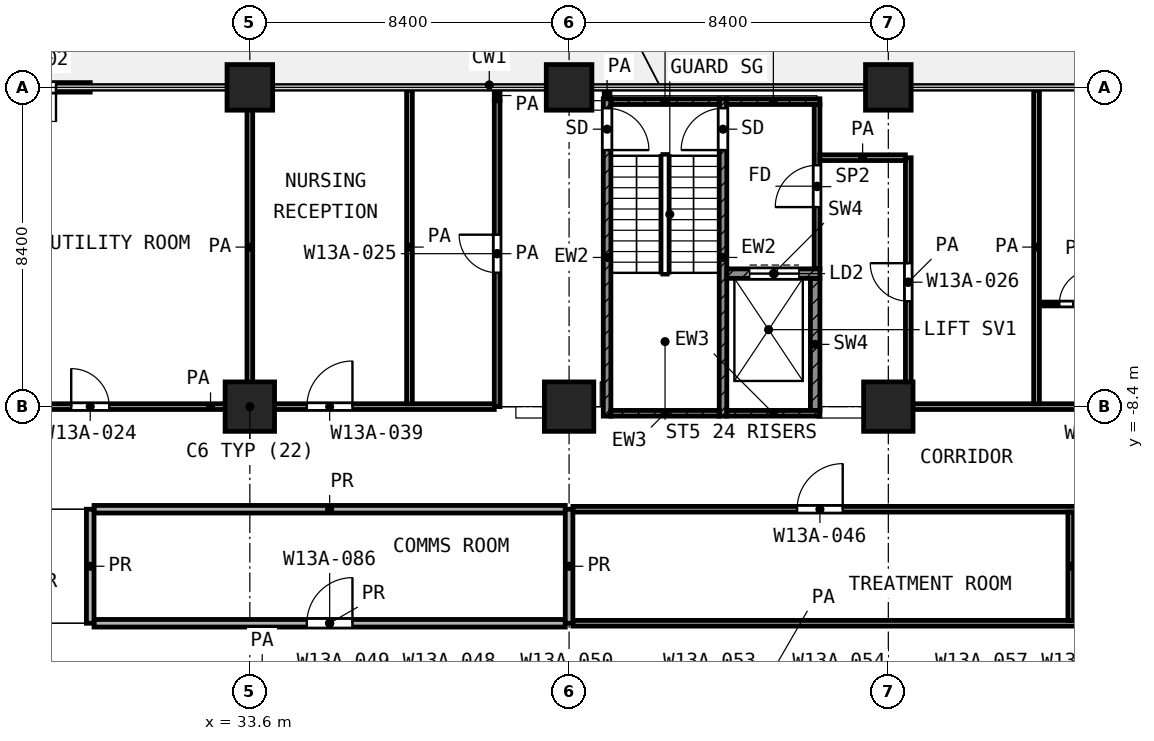
"""IFC4 building model, lengths in metres.
Left out: names, types, materials, properties, quantities, classifications, styles, units other than length and angle.
Written with IfcOpenShell. Run it as: python <this file> out.ifc"""

import sys

from ifc_helpers import new_model, si_unit, direction, frame, frame_2d, origin, origin_2d, place, context, subcontext, project, spatial, rectangle, extrude, element, fill, save


model = new_model("IFC4")
c1 = context("Model", 3, precision=1e-05, world=origin(), true_north=direction((0.0, 1.0)))
c2 = subcontext(c1, "Body", "Model", "MODEL_VIEW")
j1 = project(units=[si_unit("LENGTHUNIT", "METRE"), si_unit("PLANEANGLEUNIT", "RADIAN")], contexts=[c1])
p1 = place(None, origin())
s1 = spatial("IfcSite", under=j1, at=p1, CompositionType="ELEMENT")
p2 = place(p1, origin())
s2 = spatial("IfcBuilding", under=s1, at=p2, CompositionType="ELEMENT")
p3 = place(p2, frame((0.0, 0.0, 60.2)))
s3 = spatial("IfcBuildingStorey", under=s2, at=p3, CompositionType="ELEMENT", Elevation=60.2)
for number, where, z_axis, x_axis in (
    (1, (33.6, 0.0, 0.0), (0.0, 0.0, 1.0), (1.0, 0.0, 0.0)),
    (2, (42.0, 0.0, 0.0), (0.0, 0.0, 1.0), (1.0, 0.0, 0.0)),
    (3, (50.4, 0.0, 0.0), (0.0, 0.0, 1.0), (1.0, 0.0, 0.0)),
):
    element("IfcColumn", number, at=place(p3, frame(where, z_axis=z_axis, x_axis=x_axis)), inside=s3, PredefinedType="COLUMN", context=c2, shape_type="SweptSolid", body=[
        extrude(rectangle(XDim=1.2, YDim=1.2, at=origin_2d()), origin(), (0.0, 0.0, 1.0), 4.2),
    ])
for number, where, z_axis, x_axis in (
    (4, (33.6, -8.4, 0.0), (0.0, 0.0, 1.0), (1.0, 0.0, 0.0)),
    (5, (42.0, -8.4, 0.0), (0.0, 0.0, 1.0), (1.0, 0.0, 0.0)),
    (6, (50.4, -8.4, 0.0), (0.0, 0.0, 1.0), (1.0, 0.0, 0.0)),
):
    element("IfcColumn", number, at=place(p3, frame(where, z_axis=z_axis, x_axis=x_axis)), inside=s3, PredefinedType="COLUMN", context=c2, shape_type="SweptSolid", body=[
        extrude(rectangle(XDim=1.3, YDim=1.3, at=origin_2d()), origin(), (0.0, 0.0, 1.0), 4.2),
    ])
p4 = place(p3, frame((29.4, 0.0, 0.0), z_axis=(0.0, 0.0, 1.0), x_axis=(-1.0, 0.0, 0.0)))
e7 = element("IfcWall", 7, at=p4, inside=s3, PredefinedType="SOLIDWALL", context=c2, shape_type="SweptSolid", body=[
    extrude(rectangle(XDim=3.6, YDim=0.25, at=frame_2d((1.8, 0.0))), origin(), (0.0, 0.0, 1.0), 3.78),
])
p5 = place(p4, frame((0.9, 0.0, 0.0)))
e8 = element("IfcOpeningElement", 8, at=p5, cuts=e7, PredefinedType="OPENING", context=c2, shape_type="SweptSolid", body=[
    extrude(rectangle(XDim=1.8, YDim=2.1, at=frame_2d((0.9, 1.05))), frame((0.0, 0.135, 0.0), z_axis=(0.0, -1.0, 0.0), x_axis=(1.0, 0.0, 0.0)), (0.0, 0.0, 1.0), 0.27),
])
p6 = place(p3, frame((43.0, -8.65, 0.0), z_axis=(0.0, 0.0, 1.0), x_axis=(0.0, 1.0, 0.0)))
e9 = element("IfcWall", 9, at=p6, inside=s3, PredefinedType="SHEAR", context=c2, shape_type="SweptSolid", body=[
    extrude(rectangle(XDim=8.35, YDim=0.2, at=frame_2d((4.175, 0.0))), origin(), (0.0, 0.0, 1.0), 3.9),
])
p7 = place(p6, frame((7.0, 0.0, 0.0)))
e10 = element("IfcOpeningElement", 10, at=p7, cuts=e9, PredefinedType="OPENING", context=c2, shape_type="SweptSolid", body=[
    extrude(rectangle(XDim=1.1, YDim=2.1, at=frame_2d((0.55, 1.05))), frame((0.0, 0.11, 0.0), z_axis=(0.0, -1.0, 0.0), x_axis=(1.0, 0.0, 0.0)), (0.0, 0.0, 1.0), 0.22),
])
p8 = place(p3, frame((46.05, -8.65, 0.0), z_axis=(0.0, 0.0, 1.0), x_axis=(0.0, 1.0, 0.0)))
e11 = element("IfcWall", 11, at=p8, inside=s3, PredefinedType="SHEAR", context=c2, shape_type="SweptSolid", body=[
    extrude(rectangle(XDim=8.35, YDim=0.2, at=frame_2d((4.175, 0.0))), origin(), (0.0, 0.0, 1.0), 3.9),
])
p9 = place(p8, frame((7.0, 0.0, 0.0)))
e12 = element("IfcOpeningElement", 12, at=p9, cuts=e11, PredefinedType="OPENING", context=c2, shape_type="SweptSolid", body=[
    extrude(rectangle(XDim=1.1, YDim=2.1, at=frame_2d((0.55, 1.05))), frame((0.0, 0.11, 0.0), z_axis=(0.0, -1.0, 0.0), x_axis=(1.0, 0.0, 0.0)), (0.0, 0.0, 1.0), 0.22),
])
p10 = place(p3, frame((43.1, -0.375, 0.0), z_axis=(0.0, 0.0, 1.0), x_axis=(1.0, 0.0, 0.0)))
e13 = element("IfcWall", 13, at=p10, inside=s3, PredefinedType="SHEAR", context=c2, shape_type="SweptSolid", body=[
    extrude(rectangle(XDim=2.85, YDim=0.15, at=frame_2d((1.425, 0.0))), origin(), (0.0, 0.0, 1.0), 3.9),
])
p11 = place(p3, frame((46.15, -0.375, 0.0), z_axis=(0.0, 0.0, 1.0), x_axis=(1.0, 0.0, 0.0)))
e14 = element("IfcWall", 14, at=p11, inside=s3, PredefinedType="SHEAR", context=c2, shape_type="SweptSolid", body=[
    extrude(rectangle(XDim=2.45, YDim=0.15, at=frame_2d((1.225, 0.0))), origin(), (0.0, 0.0, 1.0), 3.9),
])
p12 = place(p3, frame((43.1, -8.575, 0.0), z_axis=(0.0, 0.0, 1.0), x_axis=(1.0, 0.0, 0.0)))
e15 = element("IfcWall", 15, at=p12, inside=s3, PredefinedType="SHEAR", context=c2, shape_type="SweptSolid", body=[
    extrude(rectangle(XDim=2.85, YDim=0.15, at=frame_2d((1.425, 0.0))), origin(), (0.0, 0.0, 1.0), 3.9),
])
p13 = place(p3, frame((46.15, -8.575, 0.0), z_axis=(0.0, 0.0, 1.0), x_axis=(1.0, 0.0, 0.0)))
e16 = element("IfcWall", 16, at=p13, inside=s3, PredefinedType="SHEAR", context=c2, shape_type="SweptSolid", body=[
    extrude(rectangle(XDim=2.45, YDim=0.15, at=frame_2d((1.225, 0.0))), origin(), (0.0, 0.0, 1.0), 3.9),
])
p14 = place(p3, frame((46.15, -4.9, 0.0), z_axis=(0.0, 0.0, 1.0), x_axis=(1.0, 0.0, 0.0)))
e17 = element("IfcWall", 17, at=p14, inside=s3, PredefinedType="SHEAR", context=c2, shape_type="SweptSolid", body=[
    extrude(rectangle(XDim=2.45, YDim=0.25, at=frame_2d((1.225, 0.0))), origin(), (0.0, 0.0, 1.0), 3.9),
])
p15 = place(p14, frame((0.6, 0.0, 0.0)))
e18 = element("IfcOpeningElement", 18, at=p15, cuts=e17, PredefinedType="OPENING", context=c2, shape_type="SweptSolid", body=[
    extrude(rectangle(XDim=1.3, YDim=2.1, at=frame_2d((0.65, 1.05))), frame((0.0, 0.135, 0.0), z_axis=(0.0, -1.0, 0.0), x_axis=(1.0, 0.0, 0.0)), (0.0, 0.0, 1.0), 0.27),
])
p16 = place(p3, frame((48.475, -8.5, 0.0), z_axis=(0.0, 0.0, 1.0), x_axis=(0.0, 1.0, 0.0)))
e19 = element("IfcWall", 19, at=p16, inside=s3, PredefinedType="SHEAR", context=c2, shape_type="SweptSolid", body=[
    extrude(rectangle(XDim=3.475, YDim=0.25, at=frame_2d((1.738, 0.0))), origin(), (0.0, 0.0, 1.0), 3.9),
])
p17 = place(p3, frame((48.525, -4.775, 0.0), z_axis=(0.0, 0.0, 1.0), x_axis=(0.0, 1.0, 0.0)))
e20 = element("IfcWall", 20, at=p17, inside=s3, PredefinedType="PARTITIONING", context=c2, shape_type="SweptSolid", body=[
    extrude(rectangle(XDim=4.325, YDim=0.15, at=frame_2d((2.163, 0.0))), origin(), (0.0, 0.0, 1.0), 3.9),
])
p18 = place(p17, frame((1.625, 0.0, 0.0)))
e21 = element("IfcOpeningElement", 21, at=p18, cuts=e20, PredefinedType="OPENING", context=c2, shape_type="SweptSolid", body=[
    extrude(rectangle(XDim=1.1, YDim=2.1, at=frame_2d((0.55, 1.05))), frame((0.0, 0.085, 0.0), z_axis=(0.0, -1.0, 0.0), x_axis=(1.0, 0.0, 0.0)), (0.0, 0.0, 1.0), 0.17),
])
p19 = place(p3, frame((54.375, -5.7, 0.0), z_axis=(0.0, 0.0, 1.0), x_axis=(1.0, 0.0, 0.0)))
e22 = element("IfcWall", 22, at=p19, inside=s3, PredefinedType="PARTITIONING", context=c2, shape_type="SweptSolid", body=[
    extrude(rectangle(XDim=1.975, YDim=0.1, at=frame_2d((0.988, 0.0))), origin(), (0.0, 0.0, 1.0), 3.9),
])
p20 = place(p19, frame((0.525, 0.0, 0.0)))
e23 = element("IfcOpeningElement", 23, at=p20, cuts=e22, PredefinedType="OPENING", context=c2, shape_type="SweptSolid", body=[
    extrude(rectangle(XDim=0.9, YDim=2.1, at=frame_2d((0.45, 1.05))), frame((0.0, 0.06, 0.0), z_axis=(0.0, -1.0, 0.0), x_axis=(1.0, 0.0, 0.0)), (0.0, 0.0, 1.0), 0.12),
])
p21 = place(p3, frame((42.1, -14.1, 0.0), z_axis=(0.0, 0.0, 1.0), x_axis=(1.0, 0.0, 0.0)))
e24 = element("IfcWall", 24, at=p21, inside=s3, PredefinedType="PARTITIONING", context=c2, shape_type="SweptSolid", body=[
    extrude(rectangle(XDim=34.925, YDim=0.15, at=frame_2d((17.462, 0.0))), origin(), (0.0, 0.0, 1.0), 3.9),
])
p22 = place(p21, frame((20.85, 0.0, 0.0)))
e25 = element("IfcOpeningElement", 25, at=p22, cuts=e24, PredefinedType="OPENING", context=c2, shape_type="SweptSolid", body=[
    extrude(rectangle(XDim=1.0, YDim=2.1, at=frame_2d((0.5, 1.05))), frame((0.0, 0.085, 0.0), z_axis=(0.0, -1.0, 0.0), x_axis=(1.0, 0.0, 0.0)), (0.0, 0.0, 1.0), 0.17),
])
p23 = place(p21, frame((31.8, 0.0, 0.0)))
e26 = element("IfcOpeningElement", 26, at=p23, cuts=e24, PredefinedType="OPENING", context=c2, shape_type="SweptSolid", body=[
    extrude(rectangle(XDim=1.0, YDim=2.1, at=frame_2d((0.5, 1.05))), frame((0.0, 0.085, 0.0), z_axis=(0.0, -1.0, 0.0), x_axis=(1.0, 0.0, 0.0)), (0.0, 0.0, 1.0), 0.17),
])
p24 = place(p3, frame((42.1, -11.1, 0.0), z_axis=(0.0, 0.0, 1.0), x_axis=(1.0, 0.0, 0.0)))
e27 = element("IfcWall", 27, at=p24, inside=s3, PredefinedType="PARTITIONING", context=c2, shape_type="SweptSolid", body=[
    extrude(rectangle(XDim=34.925, YDim=0.15, at=frame_2d((17.462, 0.0))), origin(), (0.0, 0.0, 1.0), 3.9),
])
p25 = place(p24, frame((5.9, 0.0, 0.0)))
e28 = element("IfcOpeningElement", 28, at=p25, cuts=e27, PredefinedType="OPENING", context=c2, shape_type="SweptSolid", body=[
    extrude(rectangle(XDim=1.2, YDim=2.1, at=frame_2d((0.6, 1.05))), frame((0.0, 0.085, 0.0), z_axis=(0.0, -1.0, 0.0), x_axis=(1.0, 0.0, 0.0)), (0.0, 0.0, 1.0), 0.17),
])
p26 = place(p3, frame((25.1, -8.4, 0.0), z_axis=(0.0, 0.0, 1.0), x_axis=(1.0, 0.0, 0.0)))
e29 = element("IfcWall", 29, at=p26, inside=s3, PredefinedType="PARTITIONING", context=c2, shape_type="SweptSolid", body=[
    extrude(rectangle(XDim=14.932, YDim=0.15, at=frame_2d((7.466, 0.0))), origin(), (0.0, 0.0, 1.0), 3.9),
])
p27 = place(p26, frame((3.8, 0.0, 0.0)))
e30 = element("IfcOpeningElement", 30, at=p27, cuts=e29, PredefinedType="OPENING", context=c2, shape_type="SweptSolid", body=[
    extrude(rectangle(XDim=1.0, YDim=2.1, at=frame_2d((0.5, 1.05))), frame((0.0, 0.085, 0.0), z_axis=(0.0, -1.0, 0.0), x_axis=(1.0, 0.0, 0.0)), (0.0, 0.0, 1.0), 0.17),
])
p28 = place(p26, frame((10.0, 0.0, 0.0)))
e31 = element("IfcOpeningElement", 31, at=p28, cuts=e29, PredefinedType="OPENING", context=c2, shape_type="SweptSolid", body=[
    extrude(rectangle(XDim=1.2, YDim=2.1, at=frame_2d((0.6, 1.05))), frame((0.0, 0.085, 0.0), z_axis=(0.0, -1.0, 0.0), x_axis=(1.0, 0.0, 0.0)), (0.0, 0.0, 1.0), 0.17),
])
p29 = place(p3, frame((51.0, -8.4, 0.0), z_axis=(0.0, 0.0, 1.0), x_axis=(1.0, 0.0, 0.0)))
e32 = element("IfcWall", 32, at=p29, inside=s3, PredefinedType="PARTITIONING", context=c2, shape_type="SweptSolid", body=[
    extrude(rectangle(XDim=28.72, YDim=0.15, at=frame_2d((14.36, 0.0))), origin(), (0.0, 0.0, 1.0), 3.9),
])
p30 = place(p29, frame((5.9, 0.0, 0.0)))
e33 = element("IfcOpeningElement", 33, at=p30, cuts=e32, PredefinedType="OPENING", context=c2, shape_type="SweptSolid", body=[
    extrude(rectangle(XDim=1.2, YDim=2.1, at=frame_2d((0.6, 1.05))), frame((0.0, 0.085, 0.0), z_axis=(0.0, -1.0, 0.0), x_axis=(1.0, 0.0, 0.0)), (0.0, 0.0, 1.0), 0.17),
])
p31 = place(p29, frame((8.5, 0.0, 0.0)))
e34 = element("IfcOpeningElement", 34, at=p31, cuts=e32, PredefinedType="OPENING", context=c2, shape_type="SweptSolid", body=[
    extrude(rectangle(XDim=1.2, YDim=2.1, at=frame_2d((0.6, 1.05))), frame((0.0, 0.085, 0.0), z_axis=(0.0, -1.0, 0.0), x_axis=(1.0, 0.0, 0.0)), (0.0, 0.0, 1.0), 0.17),
])
p32 = place(p29, frame((10.65, 0.0, 0.0)))
e35 = element("IfcOpeningElement", 35, at=p32, cuts=e32, PredefinedType="OPENING", context=c2, shape_type="SweptSolid", body=[
    extrude(rectangle(XDim=1.2, YDim=2.1, at=frame_2d((0.6, 1.05))), frame((0.0, 0.085, 0.0), z_axis=(0.0, -1.0, 0.0), x_axis=(1.0, 0.0, 0.0)), (0.0, 0.0, 1.0), 0.17),
])
p33 = place(p29, frame((14.6, 0.0, 0.0)))
e36 = element("IfcOpeningElement", 36, at=p33, cuts=e32, PredefinedType="OPENING", context=c2, shape_type="SweptSolid", body=[
    extrude(rectangle(XDim=0.9, YDim=2.1, at=frame_2d((0.45, 1.05))), frame((0.0, 0.085, 0.0), z_axis=(0.0, -1.0, 0.0), x_axis=(1.0, 0.0, 0.0)), (0.0, 0.0, 1.0), 0.17),
])
p34 = place(p29, frame((18.15, 0.0, 0.0)))
e37 = element("IfcOpeningElement", 37, at=p34, cuts=e32, PredefinedType="OPENING", context=c2, shape_type="SweptSolid", body=[
    extrude(rectangle(XDim=1.2, YDim=2.1, at=frame_2d((0.6, 1.05))), frame((0.0, 0.085, 0.0), z_axis=(0.0, -1.0, 0.0), x_axis=(1.0, 0.0, 0.0)), (0.0, 0.0, 1.0), 0.17),
])
p35 = place(p29, frame((22.35, 0.0, 0.0)))
e38 = element("IfcOpeningElement", 38, at=p35, cuts=e32, PredefinedType="OPENING", context=c2, shape_type="SweptSolid", body=[
    extrude(rectangle(XDim=1.5, YDim=2.1, at=frame_2d((0.75, 1.05))), frame((0.0, 0.085, 0.0), z_axis=(0.0, -1.0, 0.0), x_axis=(1.0, 0.0, 0.0)), (0.0, 0.0, 1.0), 0.17),
])
p36 = place(p3, frame((48.6, -1.85, 0.0), z_axis=(0.0, 0.0, 1.0), x_axis=(1.0, 0.0, 0.0)))
e39 = element("IfcWall", 39, at=p36, inside=s3, PredefinedType="PARTITIONING", context=c2, shape_type="SweptSolid", body=[
    extrude(rectangle(XDim=2.248, YDim=0.15, at=frame_2d((1.124, 0.0))), origin(), (0.0, 0.0, 1.0), 3.9),
])
for number, where, z_axis, x_axis in (
    (40, (33.6, -8.325, 0.0), (0.0, 0.0, 1.0), (0.0, 1.0, 0.0)),
    (41, (37.8, -8.325, 0.0), (0.0, 0.0, 1.0), (0.0, 1.0, 0.0)),
):
    element("IfcWall", number, at=place(p3, frame(where, z_axis=z_axis, x_axis=x_axis)), inside=s3, PredefinedType="PARTITIONING", context=c2, shape_type="SweptSolid", body=[
        extrude(rectangle(XDim=8.245, YDim=0.15, at=frame_2d((4.123, 0.0))), origin(), (0.0, 0.0, 1.0), 3.9),
    ])
p37 = place(p3, frame((40.107, -8.4, 0.0), z_axis=(0.0, 0.0, 1.0), x_axis=(0.0, 1.0, 0.0)))
e42 = element("IfcWall", 42, at=p37, inside=s3, PredefinedType="PARTITIONING", context=c2, shape_type="SweptSolid", body=[
    extrude(rectangle(XDim=8.048, YDim=0.15, at=frame_2d((4.024, 0.0))), origin(), (0.0, 0.0, 1.0), 3.9),
])
p38 = place(p37, frame((3.524, 0.0, 0.0)))
e43 = element("IfcOpeningElement", 43, at=p38, cuts=e42, PredefinedType="OPENING", context=c2, shape_type="SweptSolid", body=[
    extrude(rectangle(XDim=1.0, YDim=2.1, at=frame_2d((0.5, 1.05))), frame((0.0, 0.085, 0.0), z_axis=(0.0, -1.0, 0.0), x_axis=(1.0, 0.0, 0.0)), (0.0, 0.0, 1.0), 0.17),
])
p39 = place(p3, frame((40.107, -0.35, 0.0), z_axis=(0.0, 0.0, 1.0), x_axis=(0.0, 1.0, 0.0)))
e44 = element("IfcWall", 44, at=p39, inside=s3, PredefinedType="PARTITIONING", context=c2, shape_type="SweptSolid", body=[
    extrude(rectangle(XDim=0.27, YDim=0.15, at=frame_2d((0.135, 0.0))), origin(), (0.0, 0.0, 1.0), 3.9),
])
p40 = place(p3, frame((43.0, -0.27, 0.0), z_axis=(0.0, 0.0, 1.0), x_axis=(0.0, 1.0, 0.0)))
e45 = element("IfcWall", 45, at=p40, inside=s3, PredefinedType="PARTITIONING", context=c2, shape_type="SweptSolid", body=[
    extrude(rectangle(XDim=0.19, YDim=0.15, at=frame_2d((0.095, 0.0))), origin(), (0.0, 0.0, 1.0), 3.9),
])
p41 = place(p3, frame((50.925, -8.4, 0.0), z_axis=(0.0, 0.0, 1.0), x_axis=(0.0, 1.0, 0.0)))
e46 = element("IfcWall", 46, at=p41, inside=s3, PredefinedType="PARTITIONING", context=c2, shape_type="SweptSolid", body=[
    extrude(rectangle(XDim=6.548, YDim=0.15, at=frame_2d((3.274, 0.0))), origin(), (0.0, 0.0, 1.0), 3.9),
])
p42 = place(p41, frame((2.774, 0.0, 0.0)))
e47 = element("IfcOpeningElement", 47, at=p42, cuts=e46, PredefinedType="OPENING", context=c2, shape_type="SweptSolid", body=[
    extrude(rectangle(XDim=1.0, YDim=2.1, at=frame_2d((0.5, 1.05))), frame((0.0, 0.085, 0.0), z_axis=(0.0, -1.0, 0.0), x_axis=(1.0, 0.0, 0.0)), (0.0, 0.0, 1.0), 0.17),
])
p43 = place(p3, frame((54.3, -8.325, 0.0), z_axis=(0.0, 0.0, 1.0), x_axis=(0.0, 1.0, 0.0)))
e48 = element("IfcWall", 48, at=p43, inside=s3, PredefinedType="PARTITIONING", context=c2, shape_type="SweptSolid", body=[
    extrude(rectangle(XDim=8.245, YDim=0.15, at=frame_2d((4.123, 0.0))), origin(), (0.0, 0.0, 1.0), 3.9),
])
p44 = place(p3, frame((55.2, -14.025, 0.0), z_axis=(0.0, 0.0, 1.0), x_axis=(0.0, 1.0, 0.0)))
e49 = element("IfcWall", 49, at=p44, inside=s3, PredefinedType="PARTITIONING", context=c2, shape_type="SweptSolid", body=[
    extrude(rectangle(XDim=2.85, YDim=0.15, at=frame_2d((1.425, 0.0))), origin(), (0.0, 0.0, 1.0), 3.9),
])
p45 = place(p3, frame((29.5, -14.1, 0.0), z_axis=(0.0, 0.0, 1.0), x_axis=(1.0, 0.0, 0.0)))
e50 = element("IfcWall", 50, at=p45, inside=s3, PredefinedType="PARTITIONING", context=c2, shape_type="SweptSolid", body=[
    extrude(rectangle(XDim=12.4, YDim=0.2, at=frame_2d((6.2, 0.0))), origin(), (0.0, 0.0, 1.0), 3.9),
])
p46 = place(p45, frame((5.6, 0.0, 0.0)))
e51 = element("IfcOpeningElement", 51, at=p46, cuts=e50, PredefinedType="OPENING", context=c2, shape_type="SweptSolid", body=[
    extrude(rectangle(XDim=1.2, YDim=2.1, at=frame_2d((0.6, 1.05))), frame((0.0, 0.11, 0.0), z_axis=(0.0, -1.0, 0.0), x_axis=(1.0, 0.0, 0.0)), (0.0, 0.0, 1.0), 0.22),
])
p47 = place(p3, frame((29.5, -11.1, 0.0), z_axis=(0.0, 0.0, 1.0), x_axis=(1.0, 0.0, 0.0)))
e52 = element("IfcWall", 52, at=p47, inside=s3, PredefinedType="PARTITIONING", context=c2, shape_type="SweptSolid", body=[
    extrude(rectangle(XDim=12.4, YDim=0.2, at=frame_2d((6.2, 0.0))), origin(), (0.0, 0.0, 1.0), 3.9),
])
for number, where, z_axis, x_axis in (
    (53, (29.4, -14.1, 0.0), (0.0, 0.0, 1.0), (0.0, 1.0, 0.0)),
    (54, (42.0, -14.1, 0.0), (0.0, 0.0, 1.0), (0.0, 1.0, 0.0)),
):
    element("IfcWall", number, at=place(p3, frame(where, z_axis=z_axis, x_axis=x_axis)), inside=s3, PredefinedType="PARTITIONING", context=c2, shape_type="SweptSolid", body=[
        extrude(rectangle(XDim=3.0, YDim=0.2, at=frame_2d((1.5, 0.0))), origin(), (0.0, 0.0, 1.0), 3.9),
    ])
p48 = place(p5, origin())
e55 = element("IfcDoor", 55, at=p48, inside=s3, OperationType="DOUBLE_DOOR_SINGLE_SWING", PredefinedType="DOOR", context=c2, shape_type="SweptSolid", body=[
    extrude(rectangle(XDim=1.8, YDim=2.1, at=frame_2d((0.9, 1.05))), frame((0.0, 0.025, 0.0), z_axis=(0.0, -1.0, 0.0), x_axis=(1.0, 0.0, 0.0)), (0.0, 0.0, 1.0), 0.05),
])
fill(e8, e55)
p49 = place(p7, frame((1.1, 0.0, 0.0), z_axis=(0.0, 0.0, 1.0), x_axis=(-1.0, 0.0, 0.0)))
e56 = element("IfcDoor", 56, at=p49, inside=s3, OperationType="SINGLE_SWING_LEFT", PredefinedType="DOOR", context=c2, shape_type="SweptSolid", body=[
    extrude(rectangle(XDim=1.1, YDim=2.1, at=frame_2d((0.55, 1.05))), frame((0.0, 0.025, 0.0), z_axis=(0.0, -1.0, 0.0), x_axis=(1.0, 0.0, 0.0)), (0.0, 0.0, 1.0), 0.05),
])
fill(e10, e56)
p50 = place(p9, origin())
e57 = element("IfcDoor", 57, at=p50, inside=s3, OperationType="SINGLE_SWING_LEFT", PredefinedType="DOOR", context=c2, shape_type="SweptSolid", body=[
    extrude(rectangle(XDim=1.1, YDim=2.1, at=frame_2d((0.55, 1.05))), frame((0.0, 0.025, 0.0), z_axis=(0.0, -1.0, 0.0), x_axis=(1.0, 0.0, 0.0)), (0.0, 0.0, 1.0), 0.05),
])
fill(e12, e57)
p51 = place(p15, origin())
e58 = element("IfcDoor", 58, at=p51, inside=s3, OperationType="DOUBLE_DOOR_SLIDING", PredefinedType="DOOR", context=c2, shape_type="SweptSolid", body=[
    extrude(rectangle(XDim=1.3, YDim=2.1, at=frame_2d((0.65, 1.05))), frame((0.0, 0.025, 0.0), z_axis=(0.0, -1.0, 0.0), x_axis=(1.0, 0.0, 0.0)), (0.0, 0.0, 1.0), 0.05),
])
fill(e18, e58)
p52 = place(p18, origin())
e59 = element("IfcDoor", 59, at=p52, inside=s3, OperationType="SINGLE_SWING_LEFT", PredefinedType="DOOR", context=c2, shape_type="SweptSolid", body=[
    extrude(rectangle(XDim=1.1, YDim=2.1, at=frame_2d((0.55, 1.05))), frame((0.0, 0.025, 0.0), z_axis=(0.0, -1.0, 0.0), x_axis=(1.0, 0.0, 0.0)), (0.0, 0.0, 1.0), 0.05),
])
fill(e21, e59)
p53 = place(p27, origin())
e60 = element("IfcDoor", 60, at=p53, inside=s3, OperationType="SINGLE_SWING_LEFT", PredefinedType="DOOR", context=c2, shape_type="SweptSolid", body=[
    extrude(rectangle(XDim=1.0, YDim=2.1, at=frame_2d((0.5, 1.05))), frame((0.0, 0.025, 0.0), z_axis=(0.0, -1.0, 0.0), x_axis=(1.0, 0.0, 0.0)), (0.0, 0.0, 1.0), 0.05),
])
fill(e30, e60)
p54 = place(p28, origin())
e61 = element("IfcDoor", 61, at=p54, inside=s3, OperationType="SINGLE_SWING_RIGHT", PredefinedType="DOOR", context=c2, shape_type="SweptSolid", body=[
    extrude(rectangle(XDim=1.2, YDim=2.1, at=frame_2d((0.6, 1.05))), frame((0.0, 0.025, 0.0), z_axis=(0.0, -1.0, 0.0), x_axis=(1.0, 0.0, 0.0)), (0.0, 0.0, 1.0), 0.05),
])
fill(e31, e61)
p55 = place(p38, origin())
e62 = element("IfcDoor", 62, at=p55, inside=s3, OperationType="SINGLE_SWING_RIGHT", PredefinedType="DOOR", context=c2, shape_type="SweptSolid", body=[
    extrude(rectangle(XDim=1.0, YDim=2.1, at=frame_2d((0.5, 1.05))), frame((0.0, 0.025, 0.0), z_axis=(0.0, -1.0, 0.0), x_axis=(1.0, 0.0, 0.0)), (0.0, 0.0, 1.0), 0.05),
])
fill(e43, e62)
p56 = place(p42, origin())
e63 = element("IfcDoor", 63, at=p56, inside=s3, OperationType="SINGLE_SWING_RIGHT", PredefinedType="DOOR", context=c2, shape_type="SweptSolid", body=[
    extrude(rectangle(XDim=1.0, YDim=2.1, at=frame_2d((0.5, 1.05))), frame((0.0, 0.025, 0.0), z_axis=(0.0, -1.0, 0.0), x_axis=(1.0, 0.0, 0.0)), (0.0, 0.0, 1.0), 0.05),
])
fill(e47, e63)
p57 = place(p20, origin())
e64 = element("IfcDoor", 64, at=p57, inside=s3, OperationType="SINGLE_SWING_RIGHT", PredefinedType="DOOR", context=c2, shape_type="SweptSolid", body=[
    extrude(rectangle(XDim=0.9, YDim=2.1, at=frame_2d((0.45, 1.05))), frame((0.0, 0.025, 0.0), z_axis=(0.0, -1.0, 0.0), x_axis=(1.0, 0.0, 0.0)), (0.0, 0.0, 1.0), 0.05),
])
fill(e23, e64)
p58 = place(p46, origin())
e65 = element("IfcDoor", 65, at=p58, inside=s3, OperationType="SINGLE_SWING_RIGHT", PredefinedType="DOOR", context=c2, shape_type="SweptSolid", body=[
    extrude(rectangle(XDim=1.2, YDim=2.1, at=frame_2d((0.6, 1.05))), frame((0.0, 0.025, 0.0), z_axis=(0.0, -1.0, 0.0), x_axis=(1.0, 0.0, 0.0)), (0.0, 0.0, 1.0), 0.05),
])
fill(e51, e65)
p59 = place(p25, origin())
e66 = element("IfcDoor", 66, at=p59, inside=s3, OperationType="SINGLE_SWING_RIGHT", PredefinedType="DOOR", context=c2, shape_type="SweptSolid", body=[
    extrude(rectangle(XDim=1.2, YDim=2.1, at=frame_2d((0.6, 1.05))), frame((0.0, 0.025, 0.0), z_axis=(0.0, -1.0, 0.0), x_axis=(1.0, 0.0, 0.0)), (0.0, 0.0, 1.0), 0.05),
])
fill(e28, e66)
save(model, sys.argv[1])
